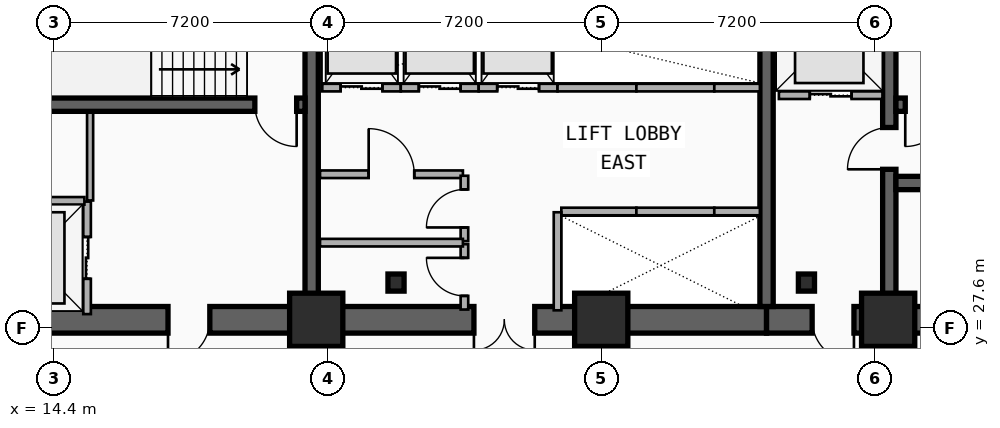
"""IFC4 building model, lengths in metres.
Left out: names, types, materials, properties, quantities, classifications, styles, units other than length and angle.
Written with IfcOpenShell. Run it as: python <this file> out.ifc"""

import sys

from ifc_helpers import new_model, si_unit, direction, frame, frame_2d, origin, origin_2d, place, context, subcontext, project, spatial, rectangle, i_section, extrude, element, fill, save


model = new_model("IFC4")
c1 = context("Model", 3, precision=1e-05, world=origin(), true_north=direction((0.0, 1.0)))
c2 = subcontext(c1, "Body", "Model", "MODEL_VIEW")
j1 = project(units=[si_unit("LENGTHUNIT", "METRE"), si_unit("PLANEANGLEUNIT", "RADIAN")], contexts=[c1])
p1 = place(None, origin())
s1 = spatial("IfcSite", under=j1, at=p1, CompositionType="ELEMENT")
p2 = place(p1, origin())
s2 = spatial("IfcBuilding", under=s1, at=p2, CompositionType="ELEMENT")
p3 = place(p2, frame((0.0, 0.0, 67.5)))
s3 = spatial("IfcBuildingStorey", under=s2, at=p3, CompositionType="ELEMENT", Elevation=67.5)
p4 = place(p3, frame((21.18, 27.82, 0.0), z_axis=(0.0, 0.0, 1.0), x_axis=(-1.0, 0.0, 0.0)))
e1 = element("IfcWall", 1, at=p4, inside=s3, PredefinedType="SHEAR", context=c2, shape_type="SweptSolid", body=[
    extrude(rectangle(XDim=9.03, YDim=0.7, at=frame_2d((4.515, 0.0))), origin(), (0.0, 0.0, 1.0), 3.5),
])
p5 = place(p4, frame((2.68, 0.0, 0.0)))
e2 = element("IfcOpeningElement", 2, at=p5, cuts=e1, PredefinedType="OPENING", context=c2, shape_type="SweptSolid", body=[
    extrude(rectangle(XDim=1.1, YDim=2.15, at=frame_2d((0.55, 1.075))), frame((0.0, 0.36, 0.0), z_axis=(0.0, -1.0, 0.0), x_axis=(1.0, 0.0, 0.0)), (0.0, 0.0, 1.0), 0.72),
])
p6 = place(p3, frame((33.15, 27.82, 0.0), z_axis=(0.0, 0.0, 1.0), x_axis=(-1.0, 0.0, 0.0)))
e3 = element("IfcWall", 3, at=p6, inside=s3, PredefinedType="SHEAR", context=c2, shape_type="SweptSolid", body=[
    extrude(rectangle(XDim=11.97, YDim=0.7, at=frame_2d((5.985, 0.0))), origin(), (0.0, 0.0, 1.0), 3.5),
])
p7 = place(p6, frame((6.1, 0.0, 0.0)))
e4 = element("IfcOpeningElement", 4, at=p7, cuts=e3, PredefinedType="OPENING", context=c2, shape_type="SweptSolid", body=[
    extrude(rectangle(XDim=1.6, YDim=2.2, at=frame_2d((0.8, 1.1))), frame((0.0, 0.36, 0.0), z_axis=(0.0, -1.0, 0.0), x_axis=(1.0, 0.0, 0.0)), (0.0, 0.0, 1.0), 0.72),
])
p8 = place(p3, frame((45.38, 27.82, 0.0), z_axis=(0.0, 0.0, 1.0), x_axis=(-1.0, 0.0, 0.0)))
e5 = element("IfcWall", 5, at=p8, inside=s3, PredefinedType="SHEAR", context=c2, shape_type="SweptSolid", body=[
    extrude(rectangle(XDim=12.23, YDim=0.7, at=frame_2d((6.115, 0.0))), origin(), (0.0, 0.0, 1.0), 3.5),
])
p9 = place(p8, frame((9.93, 0.0, 0.0)))
e6 = element("IfcOpeningElement", 6, at=p9, cuts=e5, PredefinedType="OPENING", context=c2, shape_type="SweptSolid", body=[
    extrude(rectangle(XDim=1.1, YDim=2.15, at=frame_2d((0.55, 1.075))), frame((0.0, 0.36, 0.0), z_axis=(0.0, -1.0, 0.0), x_axis=(1.0, 0.0, 0.0)), (0.0, 0.0, 1.0), 0.72),
])
p10 = place(p8, frame((6.23, 0.0, 0.0)))
e7 = element("IfcOpeningElement", 7, at=p10, cuts=e5, PredefinedType="OPENING", context=c2, shape_type="SweptSolid", body=[
    extrude(rectangle(XDim=1.1, YDim=2.15, at=frame_2d((0.55, 1.075))), frame((0.0, 0.36, 0.0), z_axis=(0.0, -1.0, 0.0), x_axis=(1.0, 0.0, 0.0)), (0.0, 0.0, 1.0), 0.72),
])
for number, where, z_axis, x_axis in (
    (8, (21.18, 28.17, 0.0), (0.0, 0.0, 1.0), (0.0, 1.0, 0.0)),
    (9, (33.15, 28.17, 0.0), (0.0, 0.0, 1.0), (0.0, 1.0, 0.0)),
):
    element("IfcWall", number, at=place(p3, frame(where, z_axis=z_axis, x_axis=x_axis)), inside=s3, PredefinedType="SHEAR", context=c2, shape_type="SweptSolid", body=[
        extrude(rectangle(XDim=8.53, YDim=0.35, at=frame_2d((4.265, 0.0))), origin(), (0.0, 0.0, 1.0), 3.5),
    ])
p11 = place(p3, frame((36.38, 28.17, 0.0), z_axis=(0.0, 0.0, 1.0), x_axis=(0.0, 1.0, 0.0)))
e10 = element("IfcWall", 10, at=p11, inside=s3, PredefinedType="SHEAR", context=c2, shape_type="SweptSolid", body=[
    extrude(rectangle(XDim=8.53, YDim=0.35, at=frame_2d((4.265, 0.0))), origin(), (0.0, 0.0, 1.0), 3.5),
])
p12 = place(p11, frame((3.61, 0.0, 0.0)))
e11 = element("IfcOpeningElement", 11, at=p12, cuts=e10, PredefinedType="OPENING", context=c2, shape_type="SweptSolid", body=[
    extrude(rectangle(XDim=1.1, YDim=2.15, at=frame_2d((0.55, 1.075))), frame((0.0, 0.185, 0.0), z_axis=(0.0, -1.0, 0.0), x_axis=(1.0, 0.0, 0.0)), (0.0, 0.0, 1.0), 0.37),
])
p13 = place(p3, frame((21.005, 33.48, 0.0), z_axis=(0.0, 0.0, 1.0), x_axis=(-1.0, 0.0, 0.0)))
e12 = element("IfcWall", 12, at=p13, inside=s3, PredefinedType="SHEAR", context=c2, shape_type="SweptSolid", body=[
    extrude(rectangle(XDim=8.505, YDim=0.35, at=frame_2d((4.252, 0.0))), origin(), (0.0, 0.0, 1.0), 3.5),
])
p14 = place(p13, frame((0.22, 0.0, 0.0)))
e13 = element("IfcOpeningElement", 13, at=p14, cuts=e12, PredefinedType="OPENING", context=c2, shape_type="SweptSolid", body=[
    extrude(rectangle(XDim=1.1, YDim=2.15, at=frame_2d((0.55, 1.075))), frame((0.0, 0.185, 0.0), z_axis=(0.0, -1.0, 0.0), x_axis=(1.0, 0.0, 0.0)), (0.0, 0.0, 1.0), 0.37),
])
p15 = place(p3, frame((45.03, 33.48, 0.0), z_axis=(0.0, 0.0, 1.0), x_axis=(-1.0, 0.0, 0.0)))
e14 = element("IfcWall", 14, at=p15, inside=s3, PredefinedType="SHEAR", context=c2, shape_type="SweptSolid", body=[
    extrude(rectangle(XDim=8.475, YDim=0.35, at=frame_2d((4.238, 0.0))), origin(), (0.0, 0.0, 1.0), 3.5),
])
p16 = place(p15, frame((7.13, 0.0, 0.0)))
e15 = element("IfcOpeningElement", 15, at=p16, cuts=e14, PredefinedType="OPENING", context=c2, shape_type="SweptSolid", body=[
    extrude(rectangle(XDim=1.1, YDim=2.15, at=frame_2d((0.55, 1.075))), frame((0.0, 0.185, 0.0), z_axis=(0.0, -1.0, 0.0), x_axis=(1.0, 0.0, 0.0)), (0.0, 0.0, 1.0), 0.37),
])
p17 = place(p3, frame((36.555, 31.42, 0.0), z_axis=(0.0, 0.0, 1.0), x_axis=(1.0, 0.0, 0.0)))
e16 = element("IfcWall", 16, at=p17, inside=s3, PredefinedType="SHEAR", context=c2, shape_type="SweptSolid", body=[
    extrude(rectangle(XDim=8.475, YDim=0.35, at=frame_2d((4.238, 0.0))), origin(), (0.0, 0.0, 1.0), 3.5),
])
for number, where, z_axis, x_axis in (
    (17, (23.4, 28.8, 0.0), (0.0, 0.0, 1.0), (1.0, 0.0, 0.0)),
    (18, (34.2, 28.8, 0.0), (0.0, 0.0, 1.0), (1.0, 0.0, 0.0)),
):
    element("IfcColumn", number, at=place(p3, frame(where, z_axis=z_axis, x_axis=x_axis)), inside=s3, PredefinedType="COLUMN", context=c2, shape_type="SweptSolid", body=[
        extrude(i_section(OverallWidth=0.424, OverallDepth=0.45, WebThickness=0.041, FlangeThickness=0.065, FilletRadius=0.015, at=origin_2d()), origin(), (0.0, 0.0, 1.0), 3.5),
    ])
for number, where, z_axis, x_axis in (
    (19, (21.3, 27.82, 0.0), (0.0, 0.0, 1.0), (1.0, 0.0, 0.0)),
    (20, (28.8, 27.82, 0.0), (0.0, 0.0, 1.0), (1.0, 0.0, 0.0)),
    (21, (36.35, 27.82, 0.0), (0.0, 0.0, 1.0), (1.0, 0.0, 0.0)),
):
    element("IfcColumn", number, at=place(p3, frame(where, z_axis=z_axis, x_axis=x_axis)), inside=s3, PredefinedType="COLUMN", context=c2, shape_type="SweptSolid", body=[
        extrude(rectangle(XDim=1.4, YDim=1.4, at=origin_2d()), origin(), (0.0, 0.0, 1.0), 3.5),
    ])
p18 = place(p3, frame((15.27, 27.97, 0.0), z_axis=(0.0, 0.0, 1.0), x_axis=(0.0, 1.0, 0.0)))
e22 = element("IfcWall", 22, at=p18, inside=s3, PredefinedType="PARTITIONING", context=c2, shape_type="SweptSolid", body=[
    extrude(rectangle(XDim=2.96, YDim=0.2, at=frame_2d((1.48, 0.0))), origin(), (0.0, 0.0, 1.0), 2.212),
])
p19 = place(p18, frame((0.93, 0.0, 0.0)))
e23 = element("IfcOpeningElement", 23, at=p19, cuts=e22, PredefinedType="OPENING", context=c2, shape_type="SweptSolid", body=[
    extrude(rectangle(XDim=1.1, YDim=2.15, at=frame_2d((0.55, 1.075))), frame((0.0, 0.11, 0.0), z_axis=(0.0, -1.0, 0.0), x_axis=(1.0, 0.0, 0.0)), (0.0, 0.0, 1.0), 0.22),
])
p20 = place(p3, frame((12.45, 30.95, 0.0), z_axis=(0.0, 0.0, 1.0), x_axis=(1.0, 0.0, 0.0)))
e24 = element("IfcWall", 24, at=p20, inside=s3, PredefinedType="PARTITIONING", context=c2, shape_type="SweptSolid", body=[
    extrude(rectangle(XDim=2.75, YDim=0.2, at=frame_2d((1.375, 0.0))), origin(), (0.0, 0.0, 1.0), 2.212),
])
p21 = place(p3, frame((33.475, 33.73, 0.0), z_axis=(0.0, 0.0, 1.0), x_axis=(1.0, 0.0, 0.0)))
e25 = element("IfcWall", 25, at=p21, inside=s3, PredefinedType="PARTITIONING", context=c2, shape_type="SweptSolid", body=[
    extrude(rectangle(XDim=2.725, YDim=0.2, at=frame_2d((1.362, 0.0))), origin(), (0.0, 0.0, 1.0), 2.212),
])
p22 = place(p21, frame((0.812, 0.0, 0.0)))
e26 = element("IfcOpeningElement", 26, at=p22, cuts=e25, PredefinedType="OPENING", context=c2, shape_type="SweptSolid", body=[
    extrude(rectangle(XDim=1.1, YDim=2.15, at=frame_2d((0.55, 1.075))), frame((0.0, 0.11, 0.0), z_axis=(0.0, -1.0, 0.0), x_axis=(1.0, 0.0, 0.0)), (0.0, 0.0, 1.0), 0.22),
])
p23 = place(p3, frame((27.75, 30.67, 0.0), z_axis=(0.0, 0.0, 1.0), x_axis=(1.0, 0.0, 0.0)))
e27 = element("IfcWall", 27, at=p23, inside=s3, PredefinedType="PARTITIONING", context=c2, shape_type="SweptSolid", body=[
    extrude(rectangle(XDim=1.975, YDim=0.2, at=frame_2d((0.988, 0.0))), origin(), (0.0, 0.0, 1.0), 2.212),
])
p24 = place(p3, frame((27.65, 28.07, 0.0), z_axis=(0.0, 0.0, 1.0), x_axis=(0.0, 1.0, 0.0)))
e28 = element("IfcWall", 28, at=p24, inside=s3, PredefinedType="PARTITIONING", context=c2, shape_type="SweptSolid", body=[
    extrude(rectangle(XDim=2.58, YDim=0.2, at=frame_2d((1.29, 0.0))), origin(), (0.0, 0.0, 1.0), 2.212),
])
p25 = place(p3, frame((29.725, 30.67, 0.0), z_axis=(0.0, 0.0, 1.0), x_axis=(1.0, 0.0, 0.0)))
e29 = element("IfcWall", 29, at=p25, inside=s3, PredefinedType="PARTITIONING", context=c2, shape_type="SweptSolid", body=[
    extrude(rectangle(XDim=2.05, YDim=0.2, at=frame_2d((1.025, 0.0))), origin(), (0.0, 0.0, 1.0), 2.62),
])
p26 = place(p3, frame((31.775, 30.67, 0.0), z_axis=(0.0, 0.0, 1.0), x_axis=(1.0, 0.0, 0.0)))
e30 = element("IfcWall", 30, at=p26, inside=s3, PredefinedType="PARTITIONING", context=c2, shape_type="SweptSolid", body=[
    extrude(rectangle(XDim=1.2, YDim=0.2, at=frame_2d((0.6, 0.0))), origin(), (0.0, 0.0, 1.0), 2.62),
])
p27 = place(p3, frame((21.46, 33.93, 0.0), z_axis=(0.0, 0.0, 1.0), x_axis=(1.0, 0.0, 0.0)))
e31 = element("IfcWall", 31, at=p27, inside=s3, PredefinedType="PARTITIONING", context=c2, shape_type="SweptSolid", body=[
    extrude(rectangle(XDim=2.065, YDim=0.2, at=frame_2d((1.032, 0.0))), origin(), (0.0, 0.0, 1.0), 2.212),
])
p28 = place(p27, frame((0.482, 0.0, 0.0)))
e32 = element("IfcOpeningElement", 32, at=p28, cuts=e31, PredefinedType="OPENING", context=c2, shape_type="SweptSolid", body=[
    extrude(rectangle(XDim=1.1, YDim=2.15, at=frame_2d((0.55, 1.075))), frame((0.0, 0.11, 0.0), z_axis=(0.0, -1.0, 0.0), x_axis=(1.0, 0.0, 0.0)), (0.0, 0.0, 1.0), 0.22),
])
p29 = place(p3, frame((23.525, 33.93, 0.0), z_axis=(0.0, 0.0, 1.0), x_axis=(1.0, 0.0, 0.0)))
e33 = element("IfcWall", 33, at=p29, inside=s3, PredefinedType="PARTITIONING", context=c2, shape_type="SweptSolid", body=[
    extrude(rectangle(XDim=2.05, YDim=0.2, at=frame_2d((1.025, 0.0))), origin(), (0.0, 0.0, 1.0), 3.24),
])
p30 = place(p29, frame((0.475, 0.0, 0.0)))
e34 = element("IfcOpeningElement", 34, at=p30, cuts=e33, PredefinedType="OPENING", context=c2, shape_type="SweptSolid", body=[
    extrude(rectangle(XDim=1.1, YDim=2.15, at=frame_2d((0.55, 1.075))), frame((0.0, 0.11, 0.0), z_axis=(0.0, -1.0, 0.0), x_axis=(1.0, 0.0, 0.0)), (0.0, 0.0, 1.0), 0.22),
])
p31 = place(p3, frame((25.575, 33.93, 0.0), z_axis=(0.0, 0.0, 1.0), x_axis=(1.0, 0.0, 0.0)))
e35 = element("IfcWall", 35, at=p31, inside=s3, PredefinedType="PARTITIONING", context=c2, shape_type="SweptSolid", body=[
    extrude(rectangle(XDim=2.075, YDim=0.2, at=frame_2d((1.038, 0.0))), origin(), (0.0, 0.0, 1.0), 3.24),
])
p32 = place(p31, frame((0.488, 0.0, 0.0)))
e36 = element("IfcOpeningElement", 36, at=p32, cuts=e35, PredefinedType="OPENING", context=c2, shape_type="SweptSolid", body=[
    extrude(rectangle(XDim=1.1, YDim=2.15, at=frame_2d((0.55, 1.075))), frame((0.0, 0.11, 0.0), z_axis=(0.0, -1.0, 0.0), x_axis=(1.0, 0.0, 0.0)), (0.0, 0.0, 1.0), 0.22),
])
p33 = place(p3, frame((27.65, 33.93, 0.0), z_axis=(0.0, 0.0, 1.0), x_axis=(1.0, 0.0, 0.0)))
e37 = element("IfcWall", 37, at=p33, inside=s3, PredefinedType="PARTITIONING", context=c2, shape_type="SweptSolid", body=[
    extrude(rectangle(XDim=2.075, YDim=0.2, at=frame_2d((1.038, 0.0))), origin(), (0.0, 0.0, 1.0), 2.212),
])
p34 = place(p3, frame((29.725, 33.93, 0.0), z_axis=(0.0, 0.0, 1.0), x_axis=(1.0, 0.0, 0.0)))
e38 = element("IfcWall", 38, at=p34, inside=s3, PredefinedType="PARTITIONING", context=c2, shape_type="SweptSolid", body=[
    extrude(rectangle(XDim=2.05, YDim=0.2, at=frame_2d((1.025, 0.0))), origin(), (0.0, 0.0, 1.0), 3.24),
])
p35 = place(p3, frame((31.775, 33.93, 0.0), z_axis=(0.0, 0.0, 1.0), x_axis=(1.0, 0.0, 0.0)))
e39 = element("IfcWall", 39, at=p35, inside=s3, PredefinedType="PARTITIONING", context=c2, shape_type="SweptSolid", body=[
    extrude(rectangle(XDim=1.2, YDim=0.2, at=frame_2d((0.6, 0.0))), origin(), (0.0, 0.0, 1.0), 3.24),
])
p36 = place(p3, frame((21.4, 31.65, 0.0), z_axis=(0.0, 0.0, 1.0), x_axis=(1.0, 0.0, 0.0)))
e40 = element("IfcWall", 40, at=p36, inside=s3, PredefinedType="PARTITIONING", context=c2, shape_type="SweptSolid", body=[
    extrude(rectangle(XDim=3.76, YDim=0.2, at=frame_2d((1.88, 0.0))), origin(), (0.0, 0.0, 1.0), 2.28),
])
p37 = place(p36, frame((1.28, 0.0, 0.0)))
e41 = element("IfcOpeningElement", 41, at=p37, cuts=e40, PredefinedType="OPENING", context=c2, shape_type="SweptSolid", body=[
    extrude(rectangle(XDim=1.2, YDim=2.15, at=frame_2d((0.6, 1.075))), frame((0.0, 0.11, 0.0), z_axis=(0.0, -1.0, 0.0), x_axis=(1.0, 0.0, 0.0)), (0.0, 0.0, 1.0), 0.22),
])
p38 = place(p3, frame((25.2, 28.09, 0.0), z_axis=(0.0, 0.0, 1.0), x_axis=(0.0, 1.0, 0.0)))
e42 = element("IfcWall", 42, at=p38, inside=s3, PredefinedType="PARTITIONING", context=c2, shape_type="SweptSolid", body=[
    extrude(rectangle(XDim=1.72, YDim=0.2, at=frame_2d((0.86, 0.0))), origin(), (0.0, 0.0, 1.0), 2.62),
])
p39 = place(p38, frame((0.36, 0.0, 0.0)))
e43 = element("IfcOpeningElement", 43, at=p39, cuts=e42, PredefinedType="OPENING", context=c2, shape_type="SweptSolid", body=[
    extrude(rectangle(XDim=1.0, YDim=2.15, at=frame_2d((0.5, 1.075))), frame((0.0, 0.11, 0.0), z_axis=(0.0, -1.0, 0.0), x_axis=(1.0, 0.0, 0.0)), (0.0, 0.0, 1.0), 0.22),
])
p40 = place(p3, frame((25.2, 29.89, 0.0), z_axis=(0.0, 0.0, 1.0), x_axis=(0.0, 1.0, 0.0)))
e44 = element("IfcWall", 44, at=p40, inside=s3, PredefinedType="PARTITIONING", context=c2, shape_type="SweptSolid", body=[
    extrude(rectangle(XDim=1.72, YDim=0.2, at=frame_2d((0.86, 0.0))), origin(), (0.0, 0.0, 1.0), 3.24),
])
p41 = place(p40, frame((0.36, 0.0, 0.0)))
e45 = element("IfcOpeningElement", 45, at=p41, cuts=e44, PredefinedType="OPENING", context=c2, shape_type="SweptSolid", body=[
    extrude(rectangle(XDim=1.0, YDim=2.15, at=frame_2d((0.5, 1.075))), frame((0.0, 0.11, 0.0), z_axis=(0.0, -1.0, 0.0), x_axis=(1.0, 0.0, 0.0)), (0.0, 0.0, 1.0), 0.22),
])
p42 = place(p3, frame((21.4, 29.85, 0.0), z_axis=(0.0, 0.0, 1.0), x_axis=(1.0, 0.0, 0.0)))
e46 = element("IfcWall", 46, at=p42, inside=s3, PredefinedType="PARTITIONING", context=c2, shape_type="SweptSolid", body=[
    extrude(rectangle(XDim=3.76, YDim=0.2, at=frame_2d((1.88, 0.0))), origin(), (0.0, 0.0, 1.0), 2.28),
])
p43 = place(p3, frame((15.35, 30.96, 0.0), z_axis=(0.0, 0.0, 1.0), x_axis=(0.0, 1.0, 0.0)))
e47 = element("IfcWall", 47, at=p43, inside=s3, PredefinedType="PARTITIONING", context=c2, shape_type="SweptSolid", body=[
    extrude(rectangle(XDim=2.31, YDim=0.16, at=frame_2d((1.155, 0.0))), origin(), (0.0, 0.0, 1.0), 3.24),
])
p44 = place(p19, origin())
e48 = element("IfcDoor", 48, at=p44, inside=s3, OperationType="DOUBLE_DOOR_SLIDING", PredefinedType="DOOR", context=c2, shape_type="SweptSolid", body=[
    extrude(rectangle(XDim=1.1, YDim=2.15, at=frame_2d((0.55, 1.075))), frame((0.0, 0.025, 0.0), z_axis=(0.0, -1.0, 0.0), x_axis=(1.0, 0.0, 0.0)), (0.0, 0.0, 1.0), 0.05),
])
fill(e23, e48)
p45 = place(p22, origin())
e49 = element("IfcDoor", 49, at=p45, inside=s3, OperationType="DOUBLE_DOOR_SLIDING", PredefinedType="DOOR", context=c2, shape_type="SweptSolid", body=[
    extrude(rectangle(XDim=1.1, YDim=2.15, at=frame_2d((0.55, 1.075))), frame((0.0, 0.025, 0.0), z_axis=(0.0, -1.0, 0.0), x_axis=(1.0, 0.0, 0.0)), (0.0, 0.0, 1.0), 0.05),
])
fill(e26, e49)
p46 = place(p28, origin())
e50 = element("IfcDoor", 50, at=p46, inside=s3, OperationType="DOUBLE_DOOR_SLIDING", PredefinedType="DOOR", context=c2, shape_type="SweptSolid", body=[
    extrude(rectangle(XDim=1.1, YDim=2.15, at=frame_2d((0.55, 1.075))), frame((0.0, 0.025, 0.0), z_axis=(0.0, -1.0, 0.0), x_axis=(1.0, 0.0, 0.0)), (0.0, 0.0, 1.0), 0.05),
])
fill(e32, e50)
p47 = place(p30, origin())
e51 = element("IfcDoor", 51, at=p47, inside=s3, OperationType="DOUBLE_DOOR_SLIDING", PredefinedType="DOOR", context=c2, shape_type="SweptSolid", body=[
    extrude(rectangle(XDim=1.1, YDim=2.15, at=frame_2d((0.55, 1.075))), frame((0.0, 0.025, 0.0), z_axis=(0.0, -1.0, 0.0), x_axis=(1.0, 0.0, 0.0)), (0.0, 0.0, 1.0), 0.05),
])
fill(e34, e51)
p48 = place(p32, origin())
e52 = element("IfcDoor", 52, at=p48, inside=s3, OperationType="DOUBLE_DOOR_SLIDING", PredefinedType="DOOR", context=c2, shape_type="SweptSolid", body=[
    extrude(rectangle(XDim=1.1, YDim=2.15, at=frame_2d((0.55, 1.075))), frame((0.0, 0.025, 0.0), z_axis=(0.0, -1.0, 0.0), x_axis=(1.0, 0.0, 0.0)), (0.0, 0.0, 1.0), 0.05),
])
fill(e36, e52)
p49 = place(p14, origin())
e53 = element("IfcDoor", 53, at=p49, inside=s3, OperationType="SINGLE_SWING_LEFT", PredefinedType="DOOR", context=c2, shape_type="SweptSolid", body=[
    extrude(rectangle(XDim=1.1, YDim=2.15, at=frame_2d((0.55, 1.075))), frame((0.0, 0.025, 0.0), z_axis=(0.0, -1.0, 0.0), x_axis=(1.0, 0.0, 0.0)), (0.0, 0.0, 1.0), 0.05),
])
fill(e13, e53)
p50 = place(p5, origin())
e54 = element("IfcDoor", 54, at=p50, inside=s3, OperationType="SINGLE_SWING_RIGHT", PredefinedType="DOOR", context=c2, shape_type="SweptSolid", body=[
    extrude(rectangle(XDim=1.1, YDim=2.15, at=frame_2d((0.55, 1.075))), frame((0.0, 0.025, 0.0), z_axis=(0.0, -1.0, 0.0), x_axis=(1.0, 0.0, 0.0)), (0.0, 0.0, 1.0), 0.05),
])
fill(e2, e54)
p51 = place(p16, origin())
e55 = element("IfcDoor", 55, at=p51, inside=s3, OperationType="SINGLE_SWING_RIGHT", PredefinedType="DOOR", context=c2, shape_type="SweptSolid", body=[
    extrude(rectangle(XDim=1.1, YDim=2.15, at=frame_2d((0.55, 1.075))), frame((0.0, 0.025, 0.0), z_axis=(0.0, -1.0, 0.0), x_axis=(1.0, 0.0, 0.0)), (0.0, 0.0, 1.0), 0.05),
])
fill(e15, e55)
p52 = place(p12, origin())
e56 = element("IfcDoor", 56, at=p52, inside=s3, OperationType="SINGLE_SWING_LEFT", PredefinedType="DOOR", context=c2, shape_type="SweptSolid", body=[
    extrude(rectangle(XDim=1.1, YDim=2.15, at=frame_2d((0.55, 1.075))), frame((0.0, 0.025, 0.0), z_axis=(0.0, -1.0, 0.0), x_axis=(1.0, 0.0, 0.0)), (0.0, 0.0, 1.0), 0.05),
])
fill(e11, e56)
p53 = place(p9, origin())
e57 = element("IfcDoor", 57, at=p53, inside=s3, OperationType="SINGLE_SWING_LEFT", PredefinedType="DOOR", context=c2, shape_type="SweptSolid", body=[
    extrude(rectangle(XDim=1.1, YDim=2.15, at=frame_2d((0.55, 1.075))), frame((0.0, 0.025, 0.0), z_axis=(0.0, -1.0, 0.0), x_axis=(1.0, 0.0, 0.0)), (0.0, 0.0, 1.0), 0.05),
])
fill(e6, e57)
p54 = place(p7, origin())
e58 = element("IfcDoor", 58, at=p54, inside=s3, OperationType="SINGLE_SWING_LEFT", PredefinedType="DOOR", context=c2, shape_type="SweptSolid", body=[
    extrude(rectangle(XDim=1.6, YDim=2.2, at=frame_2d((0.8, 1.1))), frame((0.0, 0.025, 0.0), z_axis=(0.0, -1.0, 0.0), x_axis=(1.0, 0.0, 0.0)), (0.0, 0.0, 1.0), 0.05),
])
fill(e4, e58)
p55 = place(p37, origin())
e59 = element("IfcDoor", 59, at=p55, inside=s3, OperationType="SINGLE_SWING_LEFT", PredefinedType="DOOR", context=c2, shape_type="SweptSolid", body=[
    extrude(rectangle(XDim=1.2, YDim=2.15, at=frame_2d((0.6, 1.075))), frame((0.0, 0.025, 0.0), z_axis=(0.0, -1.0, 0.0), x_axis=(1.0, 0.0, 0.0)), (0.0, 0.0, 1.0), 0.05),
])
fill(e41, e59)
p56 = place(p39, origin())
e60 = element("IfcDoor", 60, at=p56, inside=s3, OperationType="SINGLE_SWING_RIGHT", PredefinedType="DOOR", context=c2, shape_type="SweptSolid", body=[
    extrude(rectangle(XDim=1.0, YDim=2.15, at=frame_2d((0.5, 1.075))), frame((0.0, 0.025, 0.0), z_axis=(0.0, -1.0, 0.0), x_axis=(1.0, 0.0, 0.0)), (0.0, 0.0, 1.0), 0.05),
])
fill(e43, e60)
p57 = place(p41, origin())
e61 = element("IfcDoor", 61, at=p57, inside=s3, OperationType="SINGLE_SWING_LEFT", PredefinedType="DOOR", context=c2, shape_type="SweptSolid", body=[
    extrude(rectangle(XDim=1.0, YDim=2.15, at=frame_2d((0.5, 1.075))), frame((0.0, 0.025, 0.0), z_axis=(0.0, -1.0, 0.0), x_axis=(1.0, 0.0, 0.0)), (0.0, 0.0, 1.0), 0.05),
])
fill(e45, e61)
save(model, sys.argv[1])
